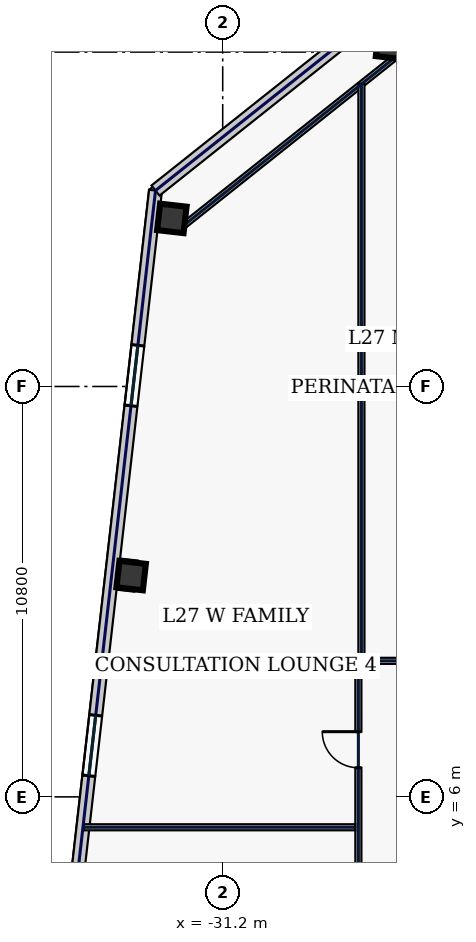
"""IFC4 building model, lengths in metres.
Left out: names, types, materials, properties, quantities, classifications, styles, units other than length and angle.
Written with IfcOpenShell. Run it as: python <this file> out.ifc"""

import sys

from ifc_helpers import new_model, si_unit, direction, frame, frame_2d, origin, origin_2d, place, context, subcontext, project, spatial, rectangle, hollow_rectangle, extrude, element, fill, save


model = new_model("IFC4")
c1 = context("Model", 3, precision=1e-05, world=origin(), true_north=direction((0.0, 1.0)))
c2 = subcontext(c1, "Body", "Model", "MODEL_VIEW")
j1 = project(units=[si_unit("LENGTHUNIT", "METRE"), si_unit("PLANEANGLEUNIT", "RADIAN")], contexts=[c1])
p1 = place(None, origin())
s1 = spatial("IfcSite", under=j1, at=p1, CompositionType="ELEMENT")
p2 = place(p1, origin())
s2 = spatial("IfcBuilding", under=s1, at=p2, CompositionType="ELEMENT")
p3 = place(p2, frame((0.0, 0.0, 121.4)))
s3 = spatial("IfcBuildingStorey", under=s2, at=p3, CompositionType="ELEMENT", Elevation=121.4)
for number, where, z_axis, x_axis in (
    (1, (-26.783, 25.801, 0.0), (0.0, 0.0, 1.0), (0.994, -0.113, 0.0)),
    (2, (-32.538, 21.223, 0.0), (0.0, 0.0, 1.0), (0.994, -0.113, 0.0)),
    (3, (-33.609, 11.824, 0.0), (0.0, 0.0, 1.0), (0.994, -0.113, 0.0)),
):
    element("IfcColumn", number, at=place(p3, frame(where, z_axis=z_axis, x_axis=x_axis)), inside=s3, PredefinedType="COLUMN", context=c2, shape_type="SweptSolid", body=[
        extrude(hollow_rectangle(XDim=0.7, YDim=0.7, WallThickness=0.032, at=origin_2d()), origin(), (0.0, 0.0, 1.0), 3.74),
    ])
p4 = place(p3, frame((-6.314, 23.982, 0.0), z_axis=(0.0, 0.0, 1.0), x_axis=(-0.993571362037, 0.113207546299, 0.0)))
e4 = element("IfcWall", 4, at=p4, inside=s3, PredefinedType="STANDARD", context=c2, shape_type="SweptSolid", body=[
    extrude(rectangle(XDim=21.223, YDim=0.34, at=frame_2d((10.611, 0.0))), origin(), (0.0, 0.0, 1.0), 3.74),
])
p5 = place(p4, frame((17.265, 0.0, 0.22)))
e5 = element("IfcOpeningElement", 5, at=p5, cuts=e4, PredefinedType="OPENING", context=c2, shape_type="SweptSolid", body=[
    extrude(rectangle(XDim=1.6, YDim=1.2, at=frame_2d((0.8, 0.6))), frame((0.0, 0.18, 0.0), z_axis=(0.0, -1.0, 0.0), x_axis=(1.0, 0.0, 0.0)), (0.0, 0.0, 1.0), 0.36),
])
p6 = place(p4, frame((12.794, 0.0, 0.67)))
e6 = element("IfcOpeningElement", 6, at=p6, cuts=e4, PredefinedType="OPENING", context=c2, shape_type="SweptSolid", body=[
    extrude(rectangle(XDim=2.1, YDim=2.2, at=frame_2d((1.05, 1.1))), frame((0.0, 0.18, 0.0), z_axis=(0.0, -1.0, 0.0), x_axis=(1.0, 0.0, 0.0)), (0.0, 0.0, 1.0), 0.36),
])
p7 = place(p4, frame((7.838, 0.0, 0.67)))
e7 = element("IfcOpeningElement", 7, at=p7, cuts=e4, PredefinedType="OPENING", context=c2, shape_type="SweptSolid", body=[
    extrude(rectangle(XDim=0.85, YDim=1.85, at=frame_2d((0.425, 0.925))), frame((0.0, 0.18, 0.0), z_axis=(0.0, -1.0, 0.0), x_axis=(1.0, 0.0, 0.0)), (0.0, 0.0, 1.0), 0.36),
])
p8 = place(p4, frame((3.616, 0.0, 0.67)))
e8 = element("IfcOpeningElement", 8, at=p8, cuts=e4, PredefinedType="OPENING", context=c2, shape_type="SweptSolid", body=[
    extrude(rectangle(XDim=2.1, YDim=2.2, at=frame_2d((1.05, 1.1))), frame((0.0, 0.18, 0.0), z_axis=(0.0, -1.0, 0.0), x_axis=(1.0, 0.0, 0.0)), (0.0, 0.0, 1.0), 0.36),
])
p9 = place(p3, frame((-32.968, 21.957, 0.0), z_axis=(0.0, 0.0, 1.0), x_axis=(-0.113201605824, -0.993572038877, 0.0)))
e9 = element("IfcWall", 9, at=p9, inside=s3, PredefinedType="STANDARD", context=c2, shape_type="SweptSolid", body=[
    extrude(rectangle(XDim=39.2, YDim=0.34, at=frame_2d((19.6, 0.0))), origin(), (0.0, 0.0, 1.0), 3.74),
])
p10 = place(p9, frame((4.1, 0.0, 0.58)))
e10 = element("IfcOpeningElement", 10, at=p10, cuts=e9, PredefinedType="OPENING", context=c2, shape_type="SweptSolid", body=[
    extrude(rectangle(XDim=1.6, YDim=2.3, at=frame_2d((0.8, 1.15))), frame((0.0, 0.18, 0.0), z_axis=(0.0, -1.0, 0.0), x_axis=(1.0, 0.0, 0.0)), (0.0, 0.0, 1.0), 0.36),
])
p11 = place(p9, frame((13.9, 0.0, 0.58)))
e11 = element("IfcOpeningElement", 11, at=p11, cuts=e9, PredefinedType="OPENING", context=c2, shape_type="SweptSolid", body=[
    extrude(rectangle(XDim=1.6, YDim=2.3, at=frame_2d((0.8, 1.15))), frame((0.0, 0.18, 0.0), z_axis=(0.0, -1.0, 0.0), x_axis=(1.0, 0.0, 0.0)), (0.0, 0.0, 1.0), 0.36),
])
p12 = place(p9, frame((23.7, 0.0, 0.58)))
e12 = element("IfcOpeningElement", 12, at=p12, cuts=e9, PredefinedType="OPENING", context=c2, shape_type="SweptSolid", body=[
    extrude(rectangle(XDim=1.6, YDim=2.3, at=frame_2d((0.8, 1.15))), frame((0.0, 0.18, 0.0), z_axis=(0.0, -1.0, 0.0), x_axis=(1.0, 0.0, 0.0)), (0.0, 0.0, 1.0), 0.36),
])
p13 = place(p9, frame((33.5, 0.0, 0.58)))
e13 = element("IfcOpeningElement", 13, at=p13, cuts=e9, PredefinedType="OPENING", context=c2, shape_type="SweptSolid", body=[
    extrude(rectangle(XDim=1.6, YDim=2.3, at=frame_2d((0.8, 1.15))), frame((0.0, 0.18, 0.0), z_axis=(0.0, -1.0, 0.0), x_axis=(1.0, 0.0, 0.0)), (0.0, 0.0, 1.0), 0.36),
])
p14 = place(p3, frame((-27.401, 26.385, 0.0), z_axis=(0.0, 0.0, 1.0), x_axis=(-0.78261359446, -0.622507800567, 0.0)))
e14 = element("IfcWall", 14, at=p14, inside=s3, PredefinedType="STANDARD", context=c2, shape_type="SweptSolid", body=[
    extrude(rectangle(XDim=7.114, YDim=0.34, at=frame_2d((3.557, 0.0))), origin(), (0.0, 0.0, 1.0), 3.74),
])
p15 = place(p3, frame((-26.571, 25.535, 0.0), z_axis=(0.0, 0.0, 1.0), x_axis=(-0.782617962887, -0.622502308564, 0.0)))
e15 = element("IfcWall", 15, at=p15, inside=s3, PredefinedType="PARTITIONING", context=c2, shape_type="SweptSolid", body=[
    extrude(rectangle(XDim=7.354, YDim=0.16, at=frame_2d((3.677, 0.0))), origin(), (0.0, 0.0, 1.0), 3.74),
])
p16 = place(p3, frame((-27.63, -9.215, 0.0), z_axis=(0.0, 0.0, 1.0), x_axis=(0.0, 1.0, 0.0)))
e16 = element("IfcWall", 16, at=p16, inside=s3, PredefinedType="PARTITIONING", context=c2, shape_type="SweptSolid", body=[
    extrude(rectangle(XDim=18.63, YDim=0.16, at=frame_2d((9.315, 0.0))), origin(), (0.0, 0.0, 1.0), 3.74),
])
p17 = place(p16, frame((1.769, 0.0, 0.0)))
e17 = element("IfcOpeningElement", 17, at=p17, cuts=e16, PredefinedType="OPENING", context=c2, shape_type="SweptSolid", body=[
    extrude(rectangle(XDim=0.95, YDim=2.2, at=frame_2d((0.475, 1.1))), frame((0.0, 0.09, 0.0), z_axis=(0.0, -1.0, 0.0), x_axis=(1.0, 0.0, 0.0)), (0.0, 0.0, 1.0), 0.18),
])
p18 = place(p16, frame((6.55, 0.0, 0.0)))
e18 = element("IfcOpeningElement", 18, at=p18, cuts=e16, PredefinedType="OPENING", context=c2, shape_type="SweptSolid", body=[
    extrude(rectangle(XDim=0.95, YDim=2.2, at=frame_2d((0.475, 1.1))), frame((0.0, 0.09, 0.0), z_axis=(0.0, -1.0, 0.0), x_axis=(1.0, 0.0, 0.0)), (0.0, 0.0, 1.0), 0.18),
])
p19 = place(p16, frame((12.05, 0.0, 0.0)))
e19 = element("IfcOpeningElement", 19, at=p19, cuts=e16, PredefinedType="OPENING", context=c2, shape_type="SweptSolid", body=[
    extrude(rectangle(XDim=0.95, YDim=2.2, at=frame_2d((0.475, 1.1))), frame((0.0, 0.09, 0.0), z_axis=(0.0, -1.0, 0.0), x_axis=(1.0, 0.0, 0.0)), (0.0, 0.0, 1.0), 0.18),
])
p20 = place(p16, frame((15.981, 0.0, 0.0)))
e20 = element("IfcOpeningElement", 20, at=p20, cuts=e16, PredefinedType="OPENING", context=c2, shape_type="SweptSolid", body=[
    extrude(rectangle(XDim=0.95, YDim=2.2, at=frame_2d((0.475, 1.1))), frame((0.0, 0.09, 0.0), z_axis=(0.0, -1.0, 0.0), x_axis=(1.0, 0.0, 0.0)), (0.0, 0.0, 1.0), 0.18),
])
p21 = place(p3, frame((-27.465, 9.58, 0.0), z_axis=(0.0, 0.0, 1.0), x_axis=(1.0, 0.0, 0.0)))
e21 = element("IfcWall", 21, at=p21, inside=s3, PredefinedType="PARTITIONING", context=c2, shape_type="SweptSolid", body=[
    extrude(rectangle(XDim=41.7, YDim=0.16, at=frame_2d((20.85, 0.0))), origin(), (0.0, 0.0, 1.0), 3.74),
])
p22 = place(p21, frame((2.044, 0.0, 0.0)))
e22 = element("IfcOpeningElement", 22, at=p22, cuts=e21, PredefinedType="OPENING", context=c2, shape_type="SweptSolid", body=[
    extrude(rectangle(XDim=0.95, YDim=2.2, at=frame_2d((0.475, 1.1))), frame((0.0, 0.09, 0.0), z_axis=(0.0, -1.0, 0.0), x_axis=(1.0, 0.0, 0.0)), (0.0, 0.0, 1.0), 0.18),
])
p23 = place(p21, frame((7.425, 0.0, 0.0)))
e23 = element("IfcOpeningElement", 23, at=p23, cuts=e21, PredefinedType="OPENING", context=c2, shape_type="SweptSolid", body=[
    extrude(rectangle(XDim=0.95, YDim=2.2, at=frame_2d((0.475, 1.1))), frame((0.0, 0.09, 0.0), z_axis=(0.0, -1.0, 0.0), x_axis=(1.0, 0.0, 0.0)), (0.0, 0.0, 1.0), 0.18),
])
p24 = place(p21, frame((14.975, 0.0, 0.0)))
e24 = element("IfcOpeningElement", 24, at=p24, cuts=e21, PredefinedType="OPENING", context=c2, shape_type="SweptSolid", body=[
    extrude(rectangle(XDim=1.05, YDim=2.2, at=frame_2d((0.525, 1.1))), frame((0.0, 0.09, 0.0), z_axis=(0.0, -1.0, 0.0), x_axis=(1.0, 0.0, 0.0)), (0.0, 0.0, 1.0), 0.18),
])
p25 = place(p21, frame((23.575, 0.0, 0.0)))
e25 = element("IfcOpeningElement", 25, at=p25, cuts=e21, PredefinedType="OPENING", context=c2, shape_type="SweptSolid", body=[
    extrude(rectangle(XDim=0.95, YDim=2.2, at=frame_2d((0.475, 1.1))), frame((0.0, 0.09, 0.0), z_axis=(0.0, -1.0, 0.0), x_axis=(1.0, 0.0, 0.0)), (0.0, 0.0, 1.0), 0.18),
])
p26 = place(p21, frame((32.175, 0.0, 0.0)))
e26 = element("IfcOpeningElement", 26, at=p26, cuts=e21, PredefinedType="OPENING", context=c2, shape_type="SweptSolid", body=[
    extrude(rectangle(XDim=1.15, YDim=2.2, at=frame_2d((0.575, 1.1))), frame((0.0, 0.09, 0.0), z_axis=(0.0, -1.0, 0.0), x_axis=(1.0, 0.0, 0.0)), (0.0, 0.0, 1.0), 0.18),
])
p27 = place(p3, frame((-27.55, 9.665, 0.0), z_axis=(0.0, 0.0, 1.0), x_axis=(0.0, 1.0, 0.0)))
e27 = element("IfcWall", 27, at=p27, inside=s3, PredefinedType="PARTITIONING", context=c2, shape_type="SweptSolid", body=[
    extrude(rectangle(XDim=15.109, YDim=0.16, at=frame_2d((7.554, 0.0))), origin(), (0.0, 0.0, 1.0), 3.74),
])
p28 = place(p3, frame((-34.857, 5.2, 0.0), z_axis=(0.0, 0.0, 1.0), x_axis=(1.0, 0.0, 0.0)))
e28 = element("IfcWall", 28, at=p28, inside=s3, PredefinedType="PARTITIONING", context=c2, shape_type="SweptSolid", body=[
    extrude(rectangle(XDim=7.142, YDim=0.16, at=frame_2d((3.571, 0.0))), origin(), (0.0, 0.0, 1.0), 3.74),
])
p29 = place(p10, origin())
e29 = element("IfcWindow", 29, at=p29, inside=s3, PartitioningType="SINGLE_PANEL", PredefinedType="WINDOW", context=c2, shape_type="SweptSolid", body=[
    extrude(rectangle(XDim=1.6, YDim=2.3, at=frame_2d((0.8, 1.15))), frame((0.0, 0.03, 0.0), z_axis=(0.0, -1.0, 0.0), x_axis=(1.0, 0.0, 0.0)), (0.0, 0.0, 1.0), 0.06),
])
fill(e10, e29)
p30 = place(p11, origin())
e30 = element("IfcWindow", 30, at=p30, inside=s3, PartitioningType="SINGLE_PANEL", PredefinedType="WINDOW", context=c2, shape_type="SweptSolid", body=[
    extrude(rectangle(XDim=1.6, YDim=2.3, at=frame_2d((0.8, 1.15))), frame((0.0, 0.03, 0.0), z_axis=(0.0, -1.0, 0.0), x_axis=(1.0, 0.0, 0.0)), (0.0, 0.0, 1.0), 0.06),
])
fill(e11, e30)
p31 = place(p20, origin())
e31 = element("IfcDoor", 31, at=p31, inside=s3, OperationType="SINGLE_SWING_RIGHT", PredefinedType="DOOR", context=c2, shape_type="SweptSolid", body=[
    extrude(rectangle(XDim=0.95, YDim=2.2, at=frame_2d((0.475, 1.1))), frame((0.0, 0.025, 0.0), z_axis=(0.0, -1.0, 0.0), x_axis=(1.0, 0.0, 0.0)), (0.0, 0.0, 1.0), 0.05),
])
fill(e20, e31)
save(model, sys.argv[1])
